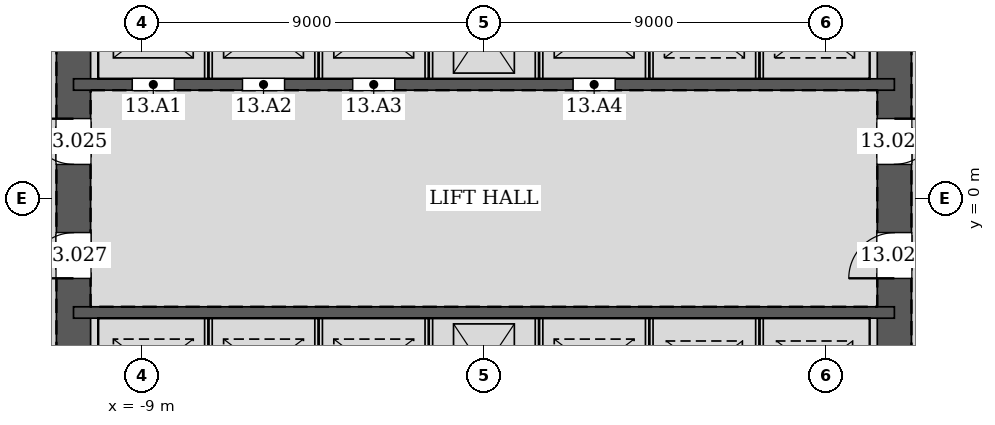
"""IFC4 building model, lengths in metres.
Left out: names, types, materials, properties, quantities, classifications, styles, units other than length and angle.
Written with IfcOpenShell. Run it as: python <this file> out.ifc"""

import sys

from ifc_helpers import new_model, si_unit, direction, frame, frame_2d, origin, place, context, subcontext, project, spatial, rectangle, extrude, element, fill, save


model = new_model("IFC4")
c1 = context("Model", 3, precision=1e-05, world=origin(), true_north=direction((0.0, 1.0)))
c2 = subcontext(c1, "Body", "Model", "MODEL_VIEW")
j1 = project(units=[si_unit("LENGTHUNIT", "METRE"), si_unit("PLANEANGLEUNIT", "RADIAN")], contexts=[c1])
p1 = place(None, origin())
s1 = spatial("IfcSite", under=j1, at=p1, CompositionType="ELEMENT")
p2 = place(p1, origin())
s2 = spatial("IfcBuilding", under=s1, at=p2, CompositionType="ELEMENT")
p3 = place(p2, frame((0.0, 0.0, 62.4)))
s3 = spatial("IfcBuildingStorey", under=s2, at=p3, CompositionType="ELEMENT", Elevation=62.4)
p4 = place(p3, frame((10.8, -10.8, 0.0), z_axis=(0.0, 0.0, 1.0), x_axis=(0.0, 1.0, 0.0)))
e1 = element("IfcWall", 1, at=p4, inside=s3, PredefinedType="SOLIDWALL", context=c2, shape_type="SweptSolid", body=[
    extrude(rectangle(XDim=21.6, YDim=0.9, at=frame_2d((10.8, 0.0))), origin(), (0.0, 0.0, 1.0), 4.2),
])
p5 = place(p4, frame((11.7, 0.0, 0.0)))
e2 = element("IfcOpeningElement", 2, at=p5, cuts=e1, PredefinedType="OPENING", context=c2, shape_type="SweptSolid", body=[
    extrude(rectangle(XDim=1.2, YDim=2.1, at=frame_2d((0.6, 1.05))), frame((0.0, 0.46, 0.0), z_axis=(0.0, -1.0, 0.0), x_axis=(1.0, 0.0, 0.0)), (0.0, 0.0, 1.0), 0.92),
])
p6 = place(p4, frame((8.7, 0.0, 0.0)))
e3 = element("IfcOpeningElement", 3, at=p6, cuts=e1, PredefinedType="OPENING", context=c2, shape_type="SweptSolid", body=[
    extrude(rectangle(XDim=1.2, YDim=2.1, at=frame_2d((0.6, 1.05))), frame((0.0, 0.46, 0.0), z_axis=(0.0, -1.0, 0.0), x_axis=(1.0, 0.0, 0.0)), (0.0, 0.0, 1.0), 0.92),
])
p7 = place(p3, frame((-10.8, 10.8, 0.0), z_axis=(0.0, 0.0, 1.0), x_axis=(0.0, -1.0, 0.0)))
e4 = element("IfcWall", 4, at=p7, inside=s3, PredefinedType="SOLIDWALL", context=c2, shape_type="SweptSolid", body=[
    extrude(rectangle(XDim=21.6, YDim=0.9, at=frame_2d((10.8, 0.0))), origin(), (0.0, 0.0, 1.0), 4.2),
])
p8 = place(p7, frame((8.7, 0.0, 0.0)))
e5 = element("IfcOpeningElement", 5, at=p8, cuts=e4, PredefinedType="OPENING", context=c2, shape_type="SweptSolid", body=[
    extrude(rectangle(XDim=1.2, YDim=2.1, at=frame_2d((0.6, 1.05))), frame((0.0, 0.46, 0.0), z_axis=(0.0, -1.0, 0.0), x_axis=(1.0, 0.0, 0.0)), (0.0, 0.0, 1.0), 0.92),
])
p9 = place(p7, frame((11.7, 0.0, 0.0)))
e6 = element("IfcOpeningElement", 6, at=p9, cuts=e4, PredefinedType="OPENING", context=c2, shape_type="SweptSolid", body=[
    extrude(rectangle(XDim=1.2, YDim=2.1, at=frame_2d((0.6, 1.05))), frame((0.0, 0.46, 0.0), z_axis=(0.0, -1.0, 0.0), x_axis=(1.0, 0.0, 0.0)), (0.0, 0.0, 1.0), 0.92),
])
p10 = place(p3, frame((-10.8, 3.0, 0.0), z_axis=(0.0, 0.0, 1.0), x_axis=(1.0, 0.0, 0.0)))
e7 = element("IfcWall", 7, at=p10, inside=s3, PredefinedType="SOLIDWALL", context=c2, shape_type="SweptSolid", body=[
    extrude(rectangle(XDim=21.6, YDim=0.3, at=frame_2d((10.8, 0.0))), origin(), (0.0, 0.0, 1.0), 4.2),
])
p11 = place(p10, frame((1.55, 0.0, 0.0)))
e8 = element("IfcOpeningElement", 8, at=p11, cuts=e7, PredefinedType="OPENING", context=c2, shape_type="SweptSolid", body=[
    extrude(rectangle(XDim=1.1, YDim=2.1, at=frame_2d((0.55, 1.05))), frame((0.0, 0.16, 0.0), z_axis=(0.0, -1.0, 0.0), x_axis=(1.0, 0.0, 0.0)), (0.0, 0.0, 1.0), 0.32),
])
p12 = place(p10, frame((4.45, 0.0, 0.0)))
e9 = element("IfcOpeningElement", 9, at=p12, cuts=e7, PredefinedType="OPENING", context=c2, shape_type="SweptSolid", body=[
    extrude(rectangle(XDim=1.1, YDim=2.1, at=frame_2d((0.55, 1.05))), frame((0.0, 0.16, 0.0), z_axis=(0.0, -1.0, 0.0), x_axis=(1.0, 0.0, 0.0)), (0.0, 0.0, 1.0), 0.32),
])
p13 = place(p10, frame((7.35, 0.0, 0.0)))
e10 = element("IfcOpeningElement", 10, at=p13, cuts=e7, PredefinedType="OPENING", context=c2, shape_type="SweptSolid", body=[
    extrude(rectangle(XDim=1.1, YDim=2.1, at=frame_2d((0.55, 1.05))), frame((0.0, 0.16, 0.0), z_axis=(0.0, -1.0, 0.0), x_axis=(1.0, 0.0, 0.0)), (0.0, 0.0, 1.0), 0.32),
])
p14 = place(p10, frame((13.15, 0.0, 0.0)))
e11 = element("IfcOpeningElement", 11, at=p14, cuts=e7, PredefinedType="OPENING", context=c2, shape_type="SweptSolid", body=[
    extrude(rectangle(XDim=1.1, YDim=2.1, at=frame_2d((0.55, 1.05))), frame((0.0, 0.16, 0.0), z_axis=(0.0, -1.0, 0.0), x_axis=(1.0, 0.0, 0.0)), (0.0, 0.0, 1.0), 0.32),
])
p15 = place(p3, frame((-10.8, -3.0, 0.0), z_axis=(0.0, 0.0, 1.0), x_axis=(1.0, 0.0, 0.0)))
e12 = element("IfcWall", 12, at=p15, inside=s3, PredefinedType="SOLIDWALL", context=c2, shape_type="SweptSolid", body=[
    extrude(rectangle(XDim=21.6, YDim=0.3, at=frame_2d((10.8, 0.0))), origin(), (0.0, 0.0, 1.0), 4.2),
])
for number, where, z_axis, x_axis in (
    (13, (-7.25, 3.15, 0.0), (0.0, 0.0, 1.0), (0.0, 1.0, 0.0)),
    (14, (-4.35, 3.15, 0.0), (0.0, 0.0, 1.0), (0.0, 1.0, 0.0)),
    (15, (-1.45, 3.15, 0.0), (0.0, 0.0, 1.0), (0.0, 1.0, 0.0)),
    (16, (1.45, 3.15, 0.0), (0.0, 0.0, 1.0), (0.0, 1.0, 0.0)),
    (17, (4.35, 3.15, 0.0), (0.0, 0.0, 1.0), (0.0, 1.0, 0.0)),
    (18, (7.25, 3.15, 0.0), (0.0, 0.0, 1.0), (0.0, 1.0, 0.0)),
    (19, (-7.25, -5.85, 0.0), (0.0, 0.0, 1.0), (0.0, 1.0, 0.0)),
    (20, (-4.35, -5.85, 0.0), (0.0, 0.0, 1.0), (0.0, 1.0, 0.0)),
    (21, (-1.45, -5.85, 0.0), (0.0, 0.0, 1.0), (0.0, 1.0, 0.0)),
    (22, (1.45, -5.85, 0.0), (0.0, 0.0, 1.0), (0.0, 1.0, 0.0)),
    (23, (4.35, -5.85, 0.0), (0.0, 0.0, 1.0), (0.0, 1.0, 0.0)),
    (24, (7.25, -5.85, 0.0), (0.0, 0.0, 1.0), (0.0, 1.0, 0.0)),
):
    element("IfcWall", number, at=place(p3, frame(where, z_axis=z_axis, x_axis=x_axis)), inside=s3, PredefinedType="PARTITIONING", context=c2, shape_type="SweptSolid", body=[
        extrude(rectangle(XDim=2.7, YDim=0.2, at=frame_2d((1.35, 0.0))), origin(), (0.0, 0.0, 1.0), 4.2),
    ])
p16 = place(p5, frame((1.2, 0.0, 0.0), z_axis=(0.0, 0.0, 1.0), x_axis=(-1.0, 0.0, 0.0)))
e25 = element("IfcDoor", 25, at=p16, inside=s3, OperationType="SINGLE_SWING_LEFT", PredefinedType="DOOR", context=c2, shape_type="SweptSolid", body=[
    extrude(rectangle(XDim=1.2, YDim=2.1, at=frame_2d((0.6, 1.05))), frame((0.0, 0.025, 0.0), z_axis=(0.0, -1.0, 0.0), x_axis=(1.0, 0.0, 0.0)), (0.0, 0.0, 1.0), 0.05),
])
fill(e2, e25)
p17 = place(p8, frame((1.2, 0.0, 0.0), z_axis=(0.0, 0.0, 1.0), x_axis=(-1.0, 0.0, 0.0)))
e26 = element("IfcDoor", 26, at=p17, inside=s3, OperationType="SINGLE_SWING_RIGHT", PredefinedType="DOOR", context=c2, shape_type="SweptSolid", body=[
    extrude(rectangle(XDim=1.2, YDim=2.1, at=frame_2d((0.6, 1.05))), frame((0.0, 0.025, 0.0), z_axis=(0.0, -1.0, 0.0), x_axis=(1.0, 0.0, 0.0)), (0.0, 0.0, 1.0), 0.05),
])
fill(e5, e26)
p18 = place(p6, origin())
e27 = element("IfcDoor", 27, at=p18, inside=s3, OperationType="SINGLE_SWING_LEFT", PredefinedType="DOOR", context=c2, shape_type="SweptSolid", body=[
    extrude(rectangle(XDim=1.2, YDim=2.1, at=frame_2d((0.6, 1.05))), frame((0.0, 0.025, 0.0), z_axis=(0.0, -1.0, 0.0), x_axis=(1.0, 0.0, 0.0)), (0.0, 0.0, 1.0), 0.05),
])
fill(e3, e27)
p19 = place(p9, frame((1.2, 0.0, 0.0), z_axis=(0.0, 0.0, 1.0), x_axis=(-1.0, 0.0, 0.0)))
e28 = element("IfcDoor", 28, at=p19, inside=s3, OperationType="SINGLE_SWING_LEFT", PredefinedType="DOOR", context=c2, shape_type="SweptSolid", body=[
    extrude(rectangle(XDim=1.2, YDim=2.1, at=frame_2d((0.6, 1.05))), frame((0.0, 0.025, 0.0), z_axis=(0.0, -1.0, 0.0), x_axis=(1.0, 0.0, 0.0)), (0.0, 0.0, 1.0), 0.05),
])
fill(e6, e28)
p20 = place(p11, origin())
e29 = element("IfcDoor", 29, at=p20, inside=s3, OperationType="DOUBLE_DOOR_SLIDING", PredefinedType="DOOR", context=c2, shape_type="SweptSolid", body=[
    extrude(rectangle(XDim=1.1, YDim=2.1, at=frame_2d((0.55, 1.05))), frame((0.0, 0.025, 0.0), z_axis=(0.0, -1.0, 0.0), x_axis=(1.0, 0.0, 0.0)), (0.0, 0.0, 1.0), 0.05),
])
fill(e8, e29)
p21 = place(p12, origin())
e30 = element("IfcDoor", 30, at=p21, inside=s3, OperationType="DOUBLE_DOOR_SLIDING", PredefinedType="DOOR", context=c2, shape_type="SweptSolid", body=[
    extrude(rectangle(XDim=1.1, YDim=2.1, at=frame_2d((0.55, 1.05))), frame((0.0, 0.025, 0.0), z_axis=(0.0, -1.0, 0.0), x_axis=(1.0, 0.0, 0.0)), (0.0, 0.0, 1.0), 0.05),
])
fill(e9, e30)
p22 = place(p13, origin())
e31 = element("IfcDoor", 31, at=p22, inside=s3, OperationType="DOUBLE_DOOR_SLIDING", PredefinedType="DOOR", context=c2, shape_type="SweptSolid", body=[
    extrude(rectangle(XDim=1.1, YDim=2.1, at=frame_2d((0.55, 1.05))), frame((0.0, 0.025, 0.0), z_axis=(0.0, -1.0, 0.0), x_axis=(1.0, 0.0, 0.0)), (0.0, 0.0, 1.0), 0.05),
])
fill(e10, e31)
p23 = place(p14, origin())
e32 = element("IfcDoor", 32, at=p23, inside=s3, OperationType="DOUBLE_DOOR_SLIDING", PredefinedType="DOOR", context=c2, shape_type="SweptSolid", body=[
    extrude(rectangle(XDim=1.1, YDim=2.1, at=frame_2d((0.55, 1.05))), frame((0.0, 0.025, 0.0), z_axis=(0.0, -1.0, 0.0), x_axis=(1.0, 0.0, 0.0)), (0.0, 0.0, 1.0), 0.05),
])
fill(e11, e32)
save(model, sys.argv[1])
